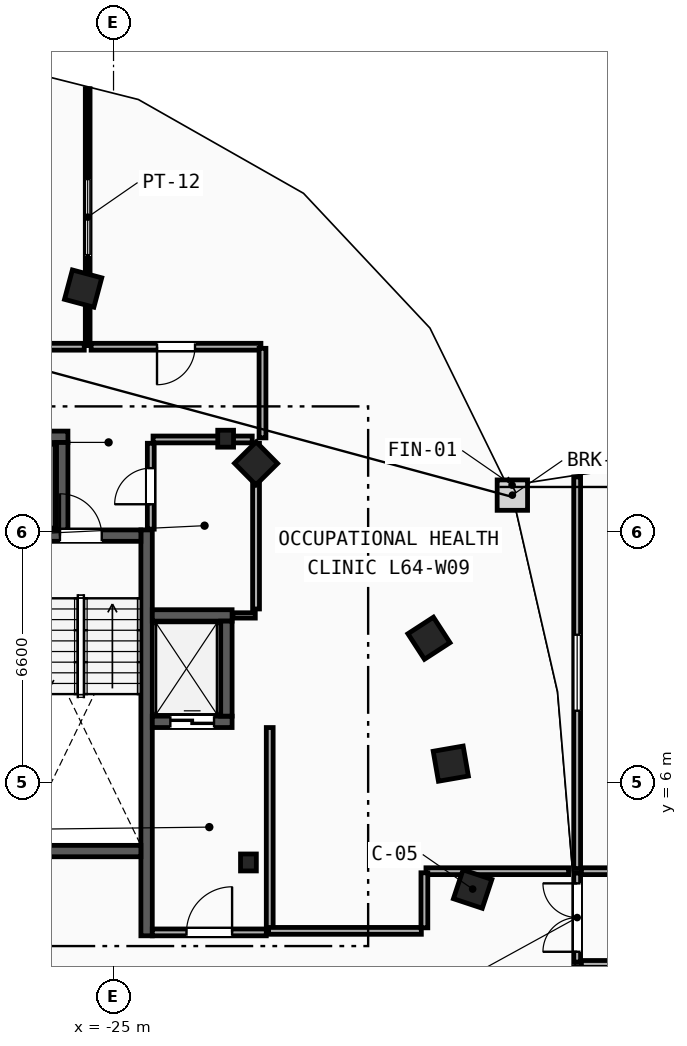
"""IFC4 building model, lengths in metres.
Left out: names, types, materials, properties, quantities, classifications, styles, units other than length and angle.
Written with IfcOpenShell. Run it as: python <this file> out.ifc"""

import sys

from ifc_helpers import new_model, si_unit, direction, frame, frame_2d, origin, origin_2d, place, context, subcontext, project, spatial, rectangle, i_section, extrude, element, fill, save


model = new_model("IFC4")
c1 = context("Model", 3, precision=1e-05, world=origin(), true_north=direction((0.0, 1.0)))
c2 = subcontext(c1, "Body", "Model", "MODEL_VIEW")
j1 = project(units=[si_unit("LENGTHUNIT", "METRE"), si_unit("PLANEANGLEUNIT", "RADIAN")], contexts=[c1])
p1 = place(None, origin())
s1 = spatial("IfcSite", under=j1, at=p1, CompositionType="ELEMENT")
p2 = place(p1, origin())
s2 = spatial("IfcBuilding", under=s1, at=p2, CompositionType="ELEMENT")
p3 = place(p2, frame((0.0, 0.0, 243.2)))
s3 = spatial("IfcBuildingStorey", under=s2, at=p3, CompositionType="ELEMENT", Elevation=243.2)
for number, where, z_axis, x_axis in (
    (1, (-21.45, 3.9, 0.0), (0.0, 0.0, 1.0), (1.0, 0.0, 0.0)),
    (2, (-22.05, 15.05, 0.0), (0.0, 0.0, 1.0), (1.0, 0.0, 0.0)),
):
    element("IfcColumn", number, at=place(p3, frame(where, z_axis=z_axis, x_axis=x_axis)), inside=s3, PredefinedType="COLUMN", context=c2, shape_type="SweptSolid", body=[
        extrude(i_section(OverallWidth=0.416, OverallDepth=0.446, WebThickness=0.039, FlangeThickness=0.063, FilletRadius=0.018, at=origin_2d()), origin(), (0.0, 0.0, 1.0), 3.6),
    ])
for number, where, z_axis, x_axis in (
    (3, (-15.55, 3.2, 0.0), (0.0, 0.0, 1.0), (0.315, 0.949, 0.0)),
    (4, (-16.125, 6.5, 0.0), (0.0, 0.0, 1.0), (-0.172, 0.985, 0.0)),
    (5, (-16.7, 9.8, 0.0), (0.0, 0.0, 1.0), (-0.544, 0.839, 0.0)),
    (6, (-21.25, 14.4, 0.0), (0.0, 0.0, 1.0), (-0.703, 0.711, 0.0)),
    (7, (-25.8, 19.0, 0.0), (0.0, 0.0, 1.0), (-0.966, 0.259, 0.0)),
):
    element("IfcColumn", number, at=place(p3, frame(where, z_axis=z_axis, x_axis=x_axis)), inside=s3, PredefinedType="COLUMN", context=c2, shape_type="SweptSolid", body=[
        extrude(rectangle(XDim=0.8, YDim=0.8, at=origin_2d()), origin(), (0.0, 0.0, 1.0), 3.6),
    ])
p4 = place(p3, frame((-24.13, 1.97, 0.0), z_axis=(0.0, 0.0, 1.0), x_axis=(0.0, 1.0, 0.0)))
e8 = element("IfcWall", 8, at=p4, inside=s3, PredefinedType="SHEAR", context=c2, shape_type="SweptSolid", body=[
    extrude(rectangle(XDim=10.68, YDim=0.3, at=frame_2d((5.34, 0.0))), origin(), (0.0, 0.0, 1.0), 3.34),
])
p5 = place(p3, frame((-27.44, 12.5, 0.0), z_axis=(0.0, 0.0, 1.0), x_axis=(1.0, 0.0, 0.0)))
e9 = element("IfcWall", 9, at=p5, inside=s3, PredefinedType="SHEAR", context=c2, shape_type="SweptSolid", body=[
    extrude(rectangle(XDim=3.16, YDim=0.3, at=frame_2d((1.58, 0.0))), origin(), (0.0, 0.0, 1.0), 3.34),
])
p6 = place(p5, frame((1.03, 0.0, 0.0)))
e10 = element("IfcOpeningElement", 10, at=p6, cuts=e9, PredefinedType="OPENING", context=c2, shape_type="SweptSolid", body=[
    extrude(rectangle(XDim=1.1, YDim=2.15, at=frame_2d((0.55, 1.075))), frame((0.0, 0.16, 0.0), z_axis=(0.0, -1.0, 0.0), x_axis=(1.0, 0.0, 0.0)), (0.0, 0.0, 1.0), 0.32),
])
p7 = place(p3, frame((-27.44, 4.2, 0.0), z_axis=(0.0, 0.0, 1.0), x_axis=(1.0, 0.0, 0.0)))
e11 = element("IfcWall", 11, at=p7, inside=s3, PredefinedType="SHEAR", context=c2, shape_type="SweptSolid", body=[
    extrude(rectangle(XDim=3.16, YDim=0.3, at=frame_2d((1.58, 0.0))), origin(), (0.0, 0.0, 1.0), 3.34),
])
p8 = place(p3, frame((-20.89, 2.15, 0.0), z_axis=(0.0, 0.0, 1.0), x_axis=(0.0, 1.0, 0.0)))
e12 = element("IfcWall", 12, at=p8, inside=s3, PredefinedType="PARTITIONING", context=c2, shape_type="SweptSolid", body=[
    extrude(rectangle(XDim=5.3, YDim=0.18, at=frame_2d((2.65, 0.0))), origin(), (0.0, 0.0, 1.0), 3.34),
])
p9 = place(p3, frame((-23.98, 2.06, 0.0), z_axis=(0.0, 0.0, 1.0), x_axis=(1.0, 0.0, 0.0)))
e13 = element("IfcWall", 13, at=p9, inside=s3, PredefinedType="PARTITIONING", context=c2, shape_type="SweptSolid", body=[
    extrude(rectangle(XDim=3.0, YDim=0.18, at=frame_2d((1.5, 0.0))), origin(), (0.0, 0.0, 1.0), 3.34),
])
p10 = place(p9, frame((0.9, 0.0, 0.0)))
e14 = element("IfcOpeningElement", 14, at=p10, cuts=e13, PredefinedType="OPENING", context=c2, shape_type="SweptSolid", body=[
    extrude(rectangle(XDim=1.2, YDim=2.15, at=frame_2d((0.6, 1.075))), frame((0.0, 0.1, 0.0), z_axis=(0.0, -1.0, 0.0), x_axis=(1.0, 0.0, 0.0)), (0.0, 0.0, 1.0), 0.2),
])
p11 = place(p3, frame((-23.98, 7.6, 0.0), z_axis=(0.0, 0.0, 1.0), x_axis=(1.0, 0.0, 0.0)))
e15 = element("IfcWall", 15, at=p11, inside=s3, PredefinedType="SHEAR", context=c2, shape_type="SweptSolid", body=[
    extrude(rectangle(XDim=2.1, YDim=0.3, at=frame_2d((1.05, 0.0))), origin(), (0.0, 0.0, 1.0), 3.34),
])
p12 = place(p11, frame((0.475, 0.0, 0.0)))
e16 = element("IfcOpeningElement", 16, at=p12, cuts=e15, PredefinedType="OPENING", context=c2, shape_type="SweptSolid", body=[
    extrude(rectangle(XDim=1.15, YDim=2.2, at=frame_2d((0.575, 1.1))), frame((0.0, 0.16, 0.0), z_axis=(0.0, -1.0, 0.0), x_axis=(1.0, 0.0, 0.0)), (0.0, 0.0, 1.0), 0.32),
])
p13 = place(p3, frame((-23.98, 10.4, 0.0), z_axis=(0.0, 0.0, 1.0), x_axis=(1.0, 0.0, 0.0)))
e17 = element("IfcWall", 17, at=p13, inside=s3, PredefinedType="SHEAR", context=c2, shape_type="SweptSolid", body=[
    extrude(rectangle(XDim=2.1, YDim=0.3, at=frame_2d((1.05, 0.0))), origin(), (0.0, 0.0, 1.0), 3.34),
])
p14 = place(p3, frame((-22.03, 7.75, 0.0), z_axis=(0.0, 0.0, 1.0), x_axis=(0.0, 1.0, 0.0)))
e18 = element("IfcWall", 18, at=p14, inside=s3, PredefinedType="SHEAR", context=c2, shape_type="SweptSolid", body=[
    extrude(rectangle(XDim=2.5, YDim=0.3, at=frame_2d((1.25, 0.0))), origin(), (0.0, 0.0, 1.0), 3.34),
])
p15 = place(p3, frame((-28.7, 15.1, 0.0), z_axis=(0.0, 0.0, 1.0), x_axis=(1.0, 0.0, 0.0)))
e19 = element("IfcWall", 19, at=p15, inside=s3, PredefinedType="SHEAR", context=c2, shape_type="SweptSolid", body=[
    extrude(rectangle(XDim=2.5, YDim=0.3, at=frame_2d((1.25, 0.0))), origin(), (0.0, 0.0, 1.0), 3.34),
])
p16 = place(p15, frame((0.6, 0.0, 0.0)))
e20 = element("IfcOpeningElement", 20, at=p16, cuts=e19, PredefinedType="OPENING", context=c2, shape_type="SweptSolid", body=[
    extrude(rectangle(XDim=1.3, YDim=2.2, at=frame_2d((0.65, 1.1))), frame((0.0, 0.16, 0.0), z_axis=(0.0, -1.0, 0.0), x_axis=(1.0, 0.0, 0.0)), (0.0, 0.0, 1.0), 0.32),
])
p17 = place(p3, frame((-26.35, 12.65, 0.0), z_axis=(0.0, 0.0, 1.0), x_axis=(0.0, 1.0, 0.0)))
e21 = element("IfcWall", 21, at=p17, inside=s3, PredefinedType="SHEAR", context=c2, shape_type="SweptSolid", body=[
    extrude(rectangle(XDim=2.3, YDim=0.3, at=frame_2d((1.15, 0.0))), origin(), (0.0, 0.0, 1.0), 3.34),
])
p18 = place(p3, frame((-21.86, 10.4, 0.0), z_axis=(0.0, 0.0, 1.0), x_axis=(1.0, 0.0, 0.0)))
e22 = element("IfcWall", 22, at=p18, inside=s3, PredefinedType="PARTITIONING", context=c2, shape_type="SweptSolid", body=[
    extrude(rectangle(XDim=0.59, YDim=0.14, at=frame_2d((0.295, 0.0))), origin(), (0.0, 0.0, 1.0), 3.34),
])
p19 = place(p3, frame((-21.25, 10.57, 0.0), z_axis=(0.0, 0.0, 1.0), x_axis=(0.0, 1.0, 0.0)))
e23 = element("IfcWall", 23, at=p19, inside=s3, PredefinedType="PARTITIONING", context=c2, shape_type="SweptSolid", body=[
    extrude(rectangle(XDim=4.36, YDim=0.18, at=frame_2d((2.18, 0.0))), origin(), (0.0, 0.0, 1.0), 3.34),
])
p20 = place(p3, frame((-23.96, 15.03, 0.0), z_axis=(0.0, 0.0, 1.0), x_axis=(1.0, 0.0, 0.0)))
e24 = element("IfcWall", 24, at=p20, inside=s3, PredefinedType="PARTITIONING", context=c2, shape_type="SweptSolid", body=[
    extrude(rectangle(XDim=2.61, YDim=0.18, at=frame_2d((1.305, 0.0))), origin(), (0.0, 0.0, 1.0), 2.413),
])
p21 = place(p3, frame((-24.02, 12.67, 0.0), z_axis=(0.0, 0.0, 1.0), x_axis=(0.0, 1.0, 0.0)))
e25 = element("IfcWall", 25, at=p21, inside=s3, PredefinedType="PARTITIONING", context=c2, shape_type="SweptSolid", body=[
    extrude(rectangle(XDim=2.26, YDim=0.18, at=frame_2d((1.13, 0.0))), origin(), (0.0, 0.0, 1.0), 3.34),
])
p22 = place(p21, frame((0.655, 0.0, 0.0)))
e26 = element("IfcOpeningElement", 26, at=p22, cuts=e25, PredefinedType="OPENING", context=c2, shape_type="SweptSolid", body=[
    extrude(rectangle(XDim=0.95, YDim=2.1, at=frame_2d((0.475, 1.05))), frame((0.0, 0.1, 0.0), z_axis=(0.0, -1.0, 0.0), x_axis=(1.0, 0.0, 0.0)), (0.0, 0.0, 1.0), 0.2),
])
p23 = place(p3, frame((-25.68, 17.5, 0.0), z_axis=(0.0, 0.0, 1.0), x_axis=(0.0, 1.0, 0.0)))
e27 = element("IfcWall", 27, at=p23, inside=s3, PredefinedType="PARTITIONING", context=c2, shape_type="SweptSolid", body=[
    extrude(rectangle(XDim=6.76, YDim=0.125, at=frame_2d((3.38, 0.0))), origin(), (0.0, 0.0, 1.0), 3.34),
])
p24 = place(p23, frame((2.38, 0.0, 1.05)))
e28 = element("IfcOpeningElement", 28, at=p24, cuts=e27, PredefinedType="OPENING", context=c2, shape_type="SweptSolid", body=[
    extrude(rectangle(XDim=2.0, YDim=1.5, at=frame_2d((1.0, 0.75))), frame((0.0, 0.073, 0.0), z_axis=(0.0, -1.0, 0.0), x_axis=(1.0, 0.0, 0.0)), (0.0, 0.0, 1.0), 0.145),
])
p25 = place(p3, frame((-21.122, 17.47, 0.0), z_axis=(0.0, 0.0, 1.0), x_axis=(-1.0, 0.0, 0.0)))
e29 = element("IfcWall", 29, at=p25, inside=s3, PredefinedType="PARTITIONING", context=c2, shape_type="SweptSolid", body=[
    extrude(rectangle(XDim=4.469, YDim=0.18, at=frame_2d((2.234, 0.0))), origin(), (0.0, 0.0, 1.0), 3.34),
])
p26 = place(p25, frame((1.734, 0.0, 0.0)))
e30 = element("IfcOpeningElement", 30, at=p26, cuts=e29, PredefinedType="OPENING", context=c2, shape_type="SweptSolid", body=[
    extrude(rectangle(XDim=1.0, YDim=2.15, at=frame_2d((0.5, 1.075))), frame((0.0, 0.1, 0.0), z_axis=(0.0, -1.0, 0.0), x_axis=(1.0, 0.0, 0.0)), (0.0, 0.0, 1.0), 0.2),
])
p27 = place(p3, frame((-16.9, 2.1, 0.0), z_axis=(0.0, 0.0, 1.0), x_axis=(-1.0, 0.0, 0.0)))
e31 = element("IfcWall", 31, at=p27, inside=s3, PredefinedType="PARTITIONING", context=c2, shape_type="SweptSolid", body=[
    extrude(rectangle(XDim=4.02, YDim=0.18, at=frame_2d((2.01, 0.0))), origin(), (0.0, 0.0, 1.0), 3.34),
])
p28 = place(p3, frame((-13.026, 3.67, 0.0), z_axis=(0.0, 0.0, 1.0), x_axis=(-1.0, 0.0, 0.0)))
e32 = element("IfcWall", 32, at=p28, inside=s3, PredefinedType="PARTITIONING", context=c2, shape_type="SweptSolid", body=[
    extrude(rectangle(XDim=3.753, YDim=0.18, at=frame_2d((1.876, 0.0))), origin(), (0.0, 0.0, 1.0), 3.34),
])
p29 = place(p3, frame((-21.08, 15.072, 0.0), z_axis=(0.0, 0.0, 1.0), x_axis=(0.0, 1.0, 0.0)))
e33 = element("IfcWall", 33, at=p29, inside=s3, PredefinedType="PARTITIONING", context=c2, shape_type="SweptSolid", body=[
    extrude(rectangle(XDim=2.357, YDim=0.18, at=frame_2d((1.178, 0.0))), origin(), (0.0, 0.0, 1.0), 3.34),
])
p30 = place(p3, frame((-16.82, 3.628, 0.0), z_axis=(0.0, 0.0, 1.0), x_axis=(0.0, -1.0, 0.0)))
e34 = element("IfcWall", 34, at=p30, inside=s3, PredefinedType="PARTITIONING", context=c2, shape_type="SweptSolid", body=[
    extrude(rectangle(XDim=1.448, YDim=0.18, at=frame_2d((0.724, 0.0))), origin(), (0.0, 0.0, 1.0), 3.34),
])
p31 = place(p3, frame((-25.77, 17.47, 0.0), z_axis=(0.0, 0.0, 1.0), x_axis=(-1.0, 0.0, 0.0)))
e35 = element("IfcWall", 35, at=p31, inside=s3, PredefinedType="PARTITIONING", context=c2, shape_type="SweptSolid", body=[
    extrude(rectangle(XDim=7.858, YDim=0.18, at=frame_2d((3.929, 0.0))), origin(), (0.0, 0.0, 1.0), 3.34),
])
p32 = place(p31, frame((3.429, 0.0, 0.0)))
e36 = element("IfcOpeningElement", 36, at=p32, cuts=e35, PredefinedType="OPENING", context=c2, shape_type="SweptSolid", body=[
    extrude(rectangle(XDim=1.0, YDim=2.15, at=frame_2d((0.5, 1.075))), frame((0.0, 0.1, 0.0), z_axis=(0.0, -1.0, 0.0), x_axis=(1.0, 0.0, 0.0)), (0.0, 0.0, 1.0), 0.2),
])
p33 = place(p3, frame((-12.688, 1.23, 0.0), z_axis=(0.0, 0.0, 1.0), x_axis=(1.0, 0.0, 0.0)))
e37 = element("IfcWall", 37, at=p33, inside=s3, PredefinedType="PARTITIONING", context=c2, shape_type="SweptSolid", body=[
    extrude(rectangle(XDim=12.594, YDim=0.18, at=frame_2d((6.297, 0.0))), origin(), (0.0, 0.0, 1.0), 2.663),
])
p34 = place(p33, frame((5.497, 0.0, 0.0)))
e38 = element("IfcOpeningElement", 38, at=p34, cuts=e37, PredefinedType="OPENING", context=c2, shape_type="SweptSolid", body=[
    extrude(rectangle(XDim=1.6, YDim=2.2, at=frame_2d((0.8, 1.1))), frame((0.0, 0.1, 0.0), z_axis=(0.0, -1.0, 0.0), x_axis=(1.0, 0.0, 0.0)), (0.0, 0.0, 1.0), 0.2),
])
p35 = place(p3, frame((-0.095, 3.67, 0.0), z_axis=(0.0, 0.0, 1.0), x_axis=(-1.0, 0.0, 0.0)))
e39 = element("IfcWall", 39, at=p35, inside=s3, PredefinedType="PARTITIONING", context=c2, shape_type="SweptSolid", body=[
    extrude(rectangle(XDim=12.594, YDim=0.18, at=frame_2d((6.297, 0.0))), origin(), (0.0, 0.0, 1.0), 3.34),
])
p36 = place(p35, frame((5.497, 0.0, 0.0)))
e40 = element("IfcOpeningElement", 40, at=p36, cuts=e39, PredefinedType="OPENING", context=c2, shape_type="SweptSolid", body=[
    extrude(rectangle(XDim=1.6, YDim=2.2, at=frame_2d((0.8, 1.1))), frame((0.0, 0.1, 0.0), z_axis=(0.0, -1.0, 0.0), x_axis=(1.0, 0.0, 0.0)), (0.0, 0.0, 1.0), 0.2),
])
p37 = place(p3, frame((-12.8, 3.74, 0.0), z_axis=(0.0, 0.0, 1.0), x_axis=(0.0, 1.0, 0.0)))
e41 = element("IfcWall", 41, at=p37, inside=s3, PredefinedType="PARTITIONING", context=c2, shape_type="SweptSolid", body=[
    extrude(rectangle(XDim=10.304, YDim=0.18, at=frame_2d((5.152, 0.0))), origin(), (0.0, 0.0, 1.0), 3.34),
])
p38 = place(p37, frame((4.152, 0.0, 1.05)))
e42 = element("IfcOpeningElement", 42, at=p38, cuts=e41, PredefinedType="OPENING", context=c2, shape_type="SweptSolid", body=[
    extrude(rectangle(XDim=2.0, YDim=1.5, at=frame_2d((1.0, 0.75))), frame((0.0, 0.1, 0.0), z_axis=(0.0, -1.0, 0.0), x_axis=(1.0, 0.0, 0.0)), (0.0, 0.0, 1.0), 0.2),
])
p39 = place(p3, frame((-12.8, 1.28, 0.0), z_axis=(0.0, 0.0, 1.0), x_axis=(0.0, 1.0, 0.0)))
e43 = element("IfcWall", 43, at=p39, inside=s3, PredefinedType="PARTITIONING", context=c2, shape_type="SweptSolid", body=[
    extrude(rectangle(XDim=2.34, YDim=0.18, at=frame_2d((1.17, 0.0))), origin(), (0.0, 0.0, 1.0), 3.34),
])
p40 = place(p39, frame((0.27, 0.0, 0.0)))
e44 = element("IfcOpeningElement", 44, at=p40, cuts=e43, PredefinedType="OPENING", context=c2, shape_type="SweptSolid", body=[
    extrude(rectangle(XDim=1.8, YDim=2.25, at=frame_2d((0.9, 1.125))), frame((0.0, 0.1, 0.0), z_axis=(0.0, -1.0, 0.0), x_axis=(1.0, 0.0, 0.0)), (0.0, 0.0, 1.0), 0.2),
])
p41 = place(p6, origin())
e45 = element("IfcDoor", 45, at=p41, inside=s3, OperationType="SINGLE_SWING_LEFT", PredefinedType="DOOR", context=c2, shape_type="SweptSolid", body=[
    extrude(rectangle(XDim=1.1, YDim=2.15, at=frame_2d((0.55, 1.075))), frame((0.0, 0.025, 0.0), z_axis=(0.0, -1.0, 0.0), x_axis=(1.0, 0.0, 0.0)), (0.0, 0.0, 1.0), 0.05),
])
fill(e10, e45)
p42 = place(p10, origin())
e46 = element("IfcDoor", 46, at=p42, inside=s3, OperationType="SINGLE_SWING_RIGHT", PredefinedType="DOOR", context=c2, shape_type="SweptSolid", body=[
    extrude(rectangle(XDim=1.2, YDim=2.15, at=frame_2d((0.6, 1.075))), frame((0.0, 0.025, 0.0), z_axis=(0.0, -1.0, 0.0), x_axis=(1.0, 0.0, 0.0)), (0.0, 0.0, 1.0), 0.05),
])
fill(e14, e46)
p43 = place(p12, origin())
e47 = element("IfcDoor", 47, at=p43, inside=s3, OperationType="SLIDING_TO_LEFT", PredefinedType="TRAPDOOR", context=c2, shape_type="SweptSolid", body=[
    extrude(rectangle(XDim=1.15, YDim=2.2, at=frame_2d((0.575, 1.1))), frame((0.0, 0.025, 0.0), z_axis=(0.0, -1.0, 0.0), x_axis=(1.0, 0.0, 0.0)), (0.0, 0.0, 1.0), 0.05),
])
fill(e16, e47)
p44 = place(p26, origin())
e48 = element("IfcDoor", 48, at=p44, inside=s3, OperationType="SINGLE_SWING_RIGHT", PredefinedType="DOOR", context=c2, shape_type="SweptSolid", body=[
    extrude(rectangle(XDim=1.0, YDim=2.15, at=frame_2d((0.5, 1.075))), frame((0.0, 0.025, 0.0), z_axis=(0.0, -1.0, 0.0), x_axis=(1.0, 0.0, 0.0)), (0.0, 0.0, 1.0), 0.05),
])
fill(e30, e48)
p45 = place(p40, origin())
e49 = element("IfcDoor", 49, at=p45, inside=s3, OperationType="DOUBLE_DOOR_SINGLE_SWING", PredefinedType="DOOR", context=c2, shape_type="SweptSolid", body=[
    extrude(rectangle(XDim=1.8, YDim=2.25, at=frame_2d((0.9, 1.125))), frame((0.0, 0.025, 0.0), z_axis=(0.0, -1.0, 0.0), x_axis=(1.0, 0.0, 0.0)), (0.0, 0.0, 1.0), 0.05),
])
fill(e44, e49)
p46 = place(p22, origin())
e50 = element("IfcDoor", 50, at=p46, inside=s3, OperationType="SINGLE_SWING_LEFT", PredefinedType="DOOR", context=c2, shape_type="SweptSolid", body=[
    extrude(rectangle(XDim=0.95, YDim=2.1, at=frame_2d((0.475, 1.05))), frame((0.0, 0.025, 0.0), z_axis=(0.0, -1.0, 0.0), x_axis=(1.0, 0.0, 0.0)), (0.0, 0.0, 1.0), 0.05),
])
fill(e26, e50)
p47 = place(p24, origin())
e51 = element("IfcWindow", 51, at=p47, inside=s3, PartitioningType="SINGLE_PANEL", PredefinedType="WINDOW", context=c2, shape_type="SweptSolid", body=[
    extrude(rectangle(XDim=2.0, YDim=1.5, at=frame_2d((1.0, 0.75))), frame((0.0, 0.03, 0.0), z_axis=(0.0, -1.0, 0.0), x_axis=(1.0, 0.0, 0.0)), (0.0, 0.0, 1.0), 0.06),
])
fill(e28, e51)
p48 = place(p38, origin())
e52 = element("IfcWindow", 52, at=p48, inside=s3, PartitioningType="SINGLE_PANEL", PredefinedType="WINDOW", context=c2, shape_type="SweptSolid", body=[
    extrude(rectangle(XDim=2.0, YDim=1.5, at=frame_2d((1.0, 0.75))), frame((0.0, 0.03, 0.0), z_axis=(0.0, -1.0, 0.0), x_axis=(1.0, 0.0, 0.0)), (0.0, 0.0, 1.0), 0.06),
])
fill(e42, e52)
save(model, sys.argv[1])
